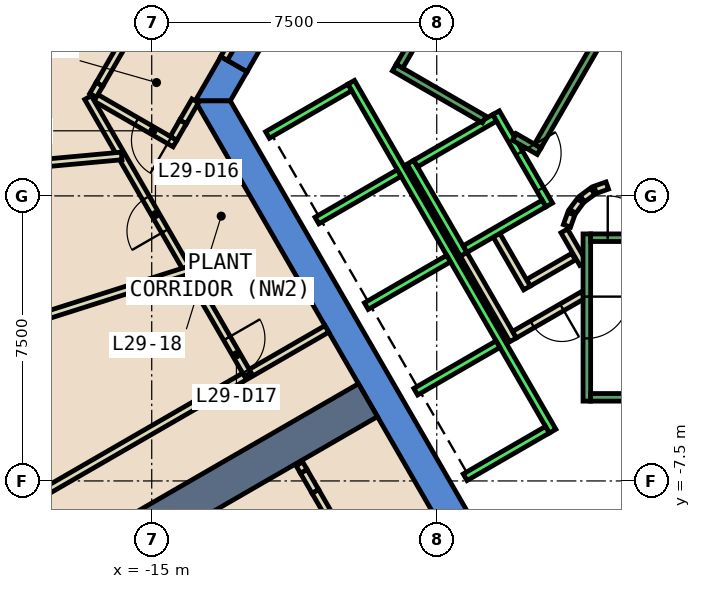
"""IFC4 building model, lengths in metres.
Left out: names, types, materials, properties, quantities, classifications, styles, units other than length and angle.
Written with IfcOpenShell. Run it as: python <this file> out.ifc"""

import sys

from ifc_helpers import new_model, si_unit, direction, frame, frame_2d, origin, place, context, subcontext, project, spatial, polyline, rectangle, outline, extrude, element, fill, save


model = new_model("IFC4")
c1 = context("Model", 3, precision=1e-05, world=origin(), true_north=direction((0.0, 1.0)))
c2 = subcontext(c1, "Body", "Model", "MODEL_VIEW")
j1 = project(units=[si_unit("LENGTHUNIT", "METRE"), si_unit("PLANEANGLEUNIT", "RADIAN")], contexts=[c1])
p1 = place(None, origin())
s1 = spatial("IfcSite", under=j1, at=p1, CompositionType="ELEMENT")
p2 = place(p1, origin())
s2 = spatial("IfcBuilding", under=s1, at=p2, CompositionType="ELEMENT")
p3 = place(p2, frame((0.0, 0.0, 132.8)))
s3 = spatial("IfcBuildingStorey", under=s2, at=p3, CompositionType="ELEMENT", Elevation=132.8)
p4 = place(p3, frame((0.0, 0.0, -0.6)))
e1 = element("IfcWall", 1, at=p4, inside=s3, PredefinedType="SHEAR", context=c2, shape_type="SweptSolid", body=[
    extrude(outline(polyline([(-12.49, 3.268), (-13.182, 3.667), (-13.856, 2.5), (-12.933, 2.5), (-12.49, 3.268)])), origin(), (0.0, 0.0, 1.0), 5.4),
])
p5 = place(p3, frame((0.0, 0.0, 3.6)))
e2 = element("IfcWall", 2, at=p5, inside=s3, PredefinedType="SHEAR", context=c2, shape_type="SweptSolid", body=[
    extrude(outline(polyline([(-13.182, 3.667), (-12.49, 3.268), (-11.575, 4.852), (-12.267, 5.252), (-13.182, 3.667)])), origin(), (0.0, 0.0, 1.0), 1.2),
])
p6 = place(p3, frame((0.0, 0.0, -0.6)))
e3 = element("IfcWall", 3, at=p6, inside=s3, PredefinedType="SHEAR", context=c2, shape_type="SweptSolid", body=[
    extrude(outline(polyline([(-13.856, 2.5), (-6.928, -9.5), (-6.466, -8.7), (-12.933, 2.5), (-13.856, 2.5)])), origin(), (0.0, 0.0, 1.0), 5.4),
])
p7 = place(p3, frame((-9.31, -5.375, 0.0), z_axis=(0.0, 0.0, 1.0), x_axis=(-0.86602173752, -0.500006350103, 0.0)))
e4 = element("IfcWall", 4, at=p7, inside=s3, PredefinedType="SHEAR", context=c2, shape_type="SweptSolid", body=[
    extrude(rectangle(XDim=31.463, YDim=1.0, at=frame_2d((15.732, 0.0))), origin(), (0.0, 0.0, 1.0), 4.8),
])
p8 = place(p3, frame((-3.9, -1.599, 0.0), z_axis=(0.0, 0.0, 1.0), x_axis=(-0.865969445389, -0.500096910261, 0.0)))
e5 = element("IfcWall", 5, at=p8, inside=s3, PredefinedType="PARTITIONING", context=c2, shape_type="SweptSolid", body=[
    extrude(rectangle(XDim=1.373, YDim=0.2, at=frame_2d((0.687, 0.0))), origin(), (0.0, 0.0, 1.0), 4.8),
])
p9 = place(p3, frame((-5.126, -2.422, 0.0), z_axis=(0.0, 0.0, 1.0), x_axis=(-0.500062241894, 0.865989465428, 0.0)))
e6 = element("IfcWall", 6, at=p9, inside=s3, PredefinedType="PARTITIONING", context=c2, shape_type="SweptSolid", body=[
    extrude(rectangle(XDim=1.7, YDim=0.2, at=frame_2d((0.85, 0.0))), origin(), (0.0, 0.0, 1.0), 4.8),
])
p10 = place(p3, frame((-5.492, -3.788, 0.0), z_axis=(0.0, 0.0, 1.0), x_axis=(-0.500008949224, 0.866020236886, 0.0)))
e7 = element("IfcWall", 7, at=p10, inside=s3, PredefinedType="PARTITIONING", context=c2, shape_type="SweptSolid", body=[
    extrude(rectangle(XDim=2.68, YDim=0.2, at=frame_2d((1.34, 0.0))), origin(), (0.0, 0.0, 1.0), 4.8),
])
p11 = place(p3, frame((-4.145, -0.92, 0.0), z_axis=(0.0, 0.0, 1.0), x_axis=(0.499743786207, -0.866173278362, 0.0)))
e8 = element("IfcWall", 8, at=p11, inside=s3, PredefinedType="PARTITIONING", context=c2, shape_type="SweptSolid", body=[
    extrude(rectangle(XDim=0.991, YDim=0.2, at=frame_2d((0.495, 0.0))), origin(), (0.0, 0.0, 1.0), 4.8),
])
p12 = place(p3, frame((-3.65, -2.61, 0.0), z_axis=(0.0, 0.0, 1.0), x_axis=(-0.866072462134, -0.499918483688, 0.0)))
e9 = element("IfcWall", 9, at=p12, inside=s3, PredefinedType="PARTITIONING", context=c2, shape_type="SweptSolid", body=[
    extrude(rectangle(XDim=2.084, YDim=0.2, at=frame_2d((1.042, 0.0))), origin(), (0.0, 0.0, 1.0), 4.8),
])
p13 = place(p12, frame((0.642, 0.0, 0.0)))
e10 = element("IfcOpeningElement", 10, at=p13, cuts=e9, PredefinedType="OPENING", context=c2, shape_type="SweptSolid", body=[
    extrude(rectangle(XDim=0.9, YDim=2.1, at=frame_2d((0.45, 1.05))), frame((0.0, 0.11, 0.0), z_axis=(0.0, -1.0, 0.0), x_axis=(1.0, 0.0, 0.0)), (0.0, 0.0, 1.0), 0.22),
])
p14 = place(p3, frame((-3.012, 0.273, 0.0), z_axis=(0.0, 0.0, 1.0), x_axis=(-0.942280615813, -0.334824194261, 0.0)))
e11 = element("IfcWall", 11, at=p14, inside=s3, PredefinedType="PARTITIONING", context=c2, shape_type="SweptSolid", body=[
    extrude(rectangle(XDim=0.338, YDim=0.2, at=frame_2d((0.169, 0.0))), origin(), (0.0, 0.0, 1.0), 4.8),
])
p15 = place(p3, frame((-3.397, 0.124, 0.0), z_axis=(0.0, 0.0, 1.0), x_axis=(-0.804311165252, -0.594208338422, 0.0)))
e12 = element("IfcWall", 12, at=p15, inside=s3, PredefinedType="PARTITIONING", context=c2, shape_type="SweptSolid", body=[
    extrude(rectangle(XDim=0.338, YDim=0.2, at=frame_2d((0.169, 0.0))), origin(), (0.0, 0.0, 1.0), 4.8),
])
p16 = place(p3, frame((-3.723, -0.131, 0.0), z_axis=(0.0, 0.0, 1.0), x_axis=(-0.594675113454, -0.803966112121, 0.0)))
e13 = element("IfcWall", 13, at=p16, inside=s3, PredefinedType="PARTITIONING", context=c2, shape_type="SweptSolid", body=[
    extrude(rectangle(XDim=0.338, YDim=0.2, at=frame_2d((0.169, 0.0))), origin(), (0.0, 0.0, 1.0), 4.8),
])
p17 = place(p3, frame((-3.96, -0.47, 0.0), z_axis=(0.0, 0.0, 1.0), x_axis=(-0.334824194261, -0.942280615813, 0.0)))
e14 = element("IfcWall", 14, at=p17, inside=s3, PredefinedType="PARTITIONING", context=c2, shape_type="SweptSolid", body=[
    extrude(rectangle(XDim=0.338, YDim=0.2, at=frame_2d((0.169, 0.0))), origin(), (0.0, 0.0, 1.0), 4.8),
])
p18 = place(p3, frame((-2.771, 4.7, 0.0), z_axis=(0.0, 0.0, 1.0), x_axis=(0.499969479948, -0.866043023828, 0.0)))
e15 = element("IfcWall", 15, at=p18, inside=s3, PredefinedType="PARTITIONING", context=c2, shape_type="SweptSolid", body=[
    extrude(rectangle(XDim=4.99, YDim=0.2, at=frame_2d((2.495, 0.0))), origin(), (0.0, 0.0, 1.0), 4.8),
])
p19 = place(p18, frame((1.945, 0.0, 0.0)))
e16 = element("IfcOpeningElement", 16, at=p19, cuts=e15, PredefinedType="OPENING", context=c2, shape_type="SweptSolid", body=[
    extrude(rectangle(XDim=1.0, YDim=2.1, at=frame_2d((0.5, 1.05))), frame((0.0, 0.11, 0.0), z_axis=(0.0, -1.0, 0.0), x_axis=(1.0, 0.0, 0.0)), (0.0, 0.0, 1.0), 0.22),
])
p20 = place(p3, frame((-39.358, -20.223, 0.0), z_axis=(0.0, 0.0, 1.0), x_axis=(0.866032184561, 0.499988255166, 0.0)))
e17 = element("IfcWall", 17, at=p20, inside=s3, PredefinedType="PARTITIONING", context=c2, shape_type="SweptSolid", body=[
    extrude(rectangle(XDim=33.447, YDim=0.2, at=frame_2d((16.723, 0.0))), origin(), (0.0, 0.0, 1.0), 4.8),
])
p21 = place(p3, frame((-13.856, 2.501, 0.0), z_axis=(0.0, 0.0, 1.0), x_axis=(-0.500766044352, -0.865582675903, 0.0)))
e18 = element("IfcWall", 18, at=p21, inside=s3, PredefinedType="PARTITIONING", context=c2, shape_type="SweptSolid", body=[
    extrude(rectangle(XDim=0.641, YDim=0.2, at=frame_2d((0.321, 0.0))), origin(), (0.0, 0.0, 1.0), 2.4),
])
p22 = place(p3, frame((-14.388, 1.379, 0.0), z_axis=(0.0, 0.0, 1.0), x_axis=(-0.866022959057, 0.500004234368, 0.0)))
e19 = element("IfcWall", 19, at=p22, inside=s3, PredefinedType="PARTITIONING", context=c2, shape_type="SweptSolid", body=[
    extrude(rectangle(XDim=2.5, YDim=0.2, at=frame_2d((1.25, 0.0))), origin(), (0.0, 0.0, 1.0), 4.8),
])
p23 = place(p22, frame((0.168, 0.0, 0.0)))
e20 = element("IfcOpeningElement", 20, at=p23, cuts=e19, PredefinedType="OPENING", context=c2, shape_type="SweptSolid", body=[
    extrude(rectangle(XDim=1.0, YDim=2.1, at=frame_2d((0.5, 1.05))), frame((0.0, 0.11, 0.0), z_axis=(0.0, -1.0, 0.0), x_axis=(1.0, 0.0, 0.0)), (0.0, 0.0, 1.0), 0.22),
])
p24 = place(p3, frame((-16.543, 2.646, 0.0), z_axis=(0.0, 0.0, 1.0), x_axis=(0.500808028896, 0.865558385202, 0.0)))
e21 = element("IfcWall", 21, at=p24, inside=s3, PredefinedType="PARTITIONING", context=c2, shape_type="SweptSolid", body=[
    extrude(rectangle(XDim=0.337, YDim=0.2, at=frame_2d((0.169, 0.0))), origin(), (0.0, 0.0, 1.0), 2.4),
])
p25 = place(p3, frame((-14.001, -2.05, 0.0), z_axis=(0.0, 0.0, 1.0), x_axis=(-0.499842197933, 0.866116491683, 0.0)))
e22 = element("IfcWall", 22, at=p25, inside=s3, PredefinedType="PARTITIONING", context=c2, shape_type="SweptSolid", body=[
    extrude(rectangle(XDim=5.354, YDim=0.2, at=frame_2d((2.677, 0.0))), origin(), (0.0, 0.0, 1.0), 4.8),
])
p26 = place(p25, frame((1.301, 0.0, 0.0)))
e23 = element("IfcOpeningElement", 23, at=p26, cuts=e22, PredefinedType="OPENING", context=c2, shape_type="SweptSolid", body=[
    extrude(rectangle(XDim=1.0, YDim=2.1, at=frame_2d((0.5, 1.05))), frame((0.0, 0.11, 0.0), z_axis=(0.0, -1.0, 0.0), x_axis=(1.0, 0.0, 0.0)), (0.0, 0.0, 1.0), 0.22),
])
p27 = place(p3, frame((-14.001, -2.05, 0.0), z_axis=(0.0, 0.0, 1.0), x_axis=(0.500026340207, -0.866010195725, 0.0)))
e24 = element("IfcWall", 24, at=p27, inside=s3, PredefinedType="PARTITIONING", context=c2, shape_type="SweptSolid", body=[
    extrude(rectangle(XDim=3.06, YDim=0.2, at=frame_2d((1.53, 0.0))), origin(), (0.0, 0.0, 1.0), 4.8),
])
p28 = place(p27, frame((1.96, 0.0, 0.0)))
e25 = element("IfcOpeningElement", 25, at=p28, cuts=e24, PredefinedType="OPENING", context=c2, shape_type="SweptSolid", body=[
    extrude(rectangle(XDim=1.0, YDim=2.1, at=frame_2d((0.5, 1.05))), frame((0.0, 0.11, 0.0), z_axis=(0.0, -1.0, 0.0), x_axis=(1.0, 0.0, 0.0)), (0.0, 0.0, 1.0), 0.22),
])
p29 = place(p3, frame((-15.791, 1.051, 0.0), z_axis=(0.0, 0.0, 1.0), x_axis=(-0.995814925951, -0.091392741793, 0.0)))
e26 = element("IfcWall", 26, at=p29, inside=s3, PredefinedType="PARTITIONING", context=c2, shape_type="SweptSolid", body=[
    extrude(rectangle(XDim=15.077, YDim=0.2, at=frame_2d((7.539, 0.0))), origin(), (0.0, 0.0, 1.0), 4.8),
])
p30 = place(p3, frame((-14.051, -1.963, 0.0), z_axis=(0.0, 0.0, 1.0), x_axis=(-0.953071469252, -0.302745395504, 0.0)))
e27 = element("IfcWall", 27, at=p30, inside=s3, PredefinedType="PARTITIONING", context=c2, shape_type="SweptSolid", body=[
    extrude(rectangle(XDim=23.905, YDim=0.2, at=frame_2d((11.952, 0.0))), origin(), (0.0, 0.0, 1.0), 4.8),
])
p31 = place(p3, frame((-12.181, 5.202, 0.0), z_axis=(0.0, 0.0, 1.0), x_axis=(-0.500215337403, -0.865901042976, 0.0)))
e28 = element("IfcWall", 28, at=p31, inside=s3, PredefinedType="PARTITIONING", context=c2, shape_type="SweptSolid", body=[
    extrude(rectangle(XDim=1.829, YDim=0.2, at=frame_2d((0.915, 0.0))), origin(), (0.0, 0.0, 1.0), 2.4),
])
p32 = place(p31, frame((0.415, 0.0, 0.0)))
e29 = element("IfcOpeningElement", 29, at=p32, cuts=e28, PredefinedType="OPENING", context=c2, shape_type="SweptSolid", body=[
    extrude(rectangle(XDim=1.0, YDim=2.1, at=frame_2d((0.5, 1.05))), frame((0.0, 0.11, 0.0), z_axis=(0.0, -1.0, 0.0), x_axis=(1.0, 0.0, 0.0)), (0.0, 0.0, 1.0), 0.22),
])
p33 = place(p3, frame((-10.2, -8.632, 0.0), z_axis=(0.0, 0.0, 1.0), x_axis=(-0.500482758314, 0.865746503678, 0.0)))
e30 = element("IfcWall", 30, at=p33, inside=s3, PredefinedType="PARTITIONING", context=c2, shape_type="SweptSolid", body=[
    extrude(rectangle(XDim=0.991, YDim=0.2, at=frame_2d((0.496, 0.0))), origin(), (0.0, 0.0, 1.0), 2.3),
])
p34 = place(p3, frame((-10.696, -7.774, 0.0), z_axis=(0.0, 0.0, 1.0), x_axis=(-0.49972245349, 0.866185586049, 0.0)))
e31 = element("IfcWall", 31, at=p34, inside=s3, PredefinedType="PARTITIONING", context=c2, shape_type="SweptSolid", body=[
    extrude(rectangle(XDim=0.608, YDim=0.2, at=frame_2d((0.304, 0.0))), origin(), (0.0, 0.0, 1.0), 4.8),
])
p35 = place(p3, frame((-11.0, -7.247, 0.0), z_axis=(0.0, 0.0, 1.0), x_axis=(-0.499504513693, 0.866311284008, 0.0)))
e32 = element("IfcWall", 32, at=p35, inside=s3, PredefinedType="PARTITIONING", context=c2, shape_type="SweptSolid", body=[
    extrude(rectangle(XDim=0.226, YDim=0.2, at=frame_2d((0.113, 0.0))), origin(), (0.0, 0.0, 1.0), 2.1),
])
p36 = place(p3, frame((-14.177, 1.946, 0.0), z_axis=(0.0, 0.0, 1.0), x_axis=(-0.499736647136, -0.866177397251, 0.0)))
e33 = element("IfcWall", 33, at=p36, inside=s3, PredefinedType="PARTITIONING", context=c2, shape_type="SweptSolid", body=[
    extrude(rectangle(XDim=0.496, YDim=0.2, at=frame_2d((0.248, 0.0))), origin(), (0.0, 0.0, 1.0), 4.8),
])
p37 = place(p3, frame((-16.374, 2.938, 0.0), z_axis=(0.0, 0.0, 1.0), x_axis=(0.49986000933, 0.866106212351, 0.0)))
e34 = element("IfcWall", 34, at=p37, inside=s3, PredefinedType="PARTITIONING", context=c2, shape_type="SweptSolid", body=[
    extrude(rectangle(XDim=3.585, YDim=0.2, at=frame_2d((1.792, 0.0))), origin(), (0.0, 0.0, 1.0), 4.8),
])
p38 = place(p37, frame((2.197, 0.0, 0.0)))
e35 = element("IfcOpeningElement", 35, at=p38, cuts=e34, PredefinedType="OPENING", context=c2, shape_type="SweptSolid", body=[
    extrude(rectangle(XDim=1.0, YDim=2.1, at=frame_2d((0.5, 1.05))), frame((0.0, 0.11, 0.0), z_axis=(0.0, -1.0, 0.0), x_axis=(1.0, 0.0, 0.0)), (0.0, 0.0, 1.0), 0.22),
])
p39 = place(p3, frame((-5.94, 2.188, 0.0), z_axis=(0.0, 0.0, 1.0), x_axis=(0.49994636267, -0.866056369097, 0.0)))
e36 = element("IfcWall", 36, at=p39, inside=s3, PredefinedType="STANDARD", context=c2, shape_type="SweptSolid", body=[
    extrude(rectangle(XDim=2.8, YDim=0.2, at=frame_2d((1.4, 0.0))), origin(), (0.0, 0.0, 1.0), 4.8),
])
p40 = place(p39, frame((1.225, 0.0, 0.0)))
e37 = element("IfcOpeningElement", 37, at=p40, cuts=e36, PredefinedType="OPENING", context=c2, shape_type="SweptSolid", body=[
    extrude(rectangle(XDim=1.1, YDim=2.1, at=frame_2d((0.55, 1.05))), frame((0.0, 0.11, 0.0), z_axis=(0.0, -1.0, 0.0), x_axis=(1.0, 0.0, 0.0)), (0.0, 0.0, 1.0), 0.22),
])
p41 = place(p3, frame((-8.192, 0.888, 0.0), z_axis=(0.0, 0.0, 1.0), x_axis=(0.49994636267, -0.866056369097, 0.0)))
e38 = element("IfcWall", 38, at=p41, inside=s3, PredefinedType="STANDARD", context=c2, shape_type="SweptSolid", body=[
    extrude(rectangle(XDim=2.8, YDim=0.2, at=frame_2d((1.4, 0.0))), origin(), (0.0, 0.0, 1.0), 4.8),
])
for number, where, z_axis, x_axis in (
    (39, (-5.977, 2.052, 0.0), (0.0, 0.0, 1.0), (-0.866, -0.5, 0.0)),
    (40, (-4.677, -0.2, 0.0), (0.0, 0.0, 1.0), (-0.866, -0.5, 0.0)),
):
    element("IfcWall", number, at=place(p3, frame(where, z_axis=z_axis, x_axis=x_axis)), inside=s3, PredefinedType="STANDARD", context=c2, shape_type="SweptSolid", body=[
        extrude(rectangle(XDim=2.399, YDim=0.2, at=frame_2d((1.2, 0.0))), origin(), (0.0, 0.0, 1.0), 4.8),
    ])
p42 = place(p3, frame((-9.751, 2.99, 0.0), z_axis=(0.0, 0.0, 1.0), x_axis=(0.50000090737, -0.866024879913, 0.0)))
e41 = element("IfcWall", 41, at=p42, inside=s3, PredefinedType="STANDARD", context=c2, shape_type="SweptSolid", body=[
    extrude(rectangle(XDim=10.6, YDim=0.2, at=frame_2d((5.3, 0.0))), origin(), (0.0, 0.0, 1.0), 4.8),
])
p43 = place(p3, frame((-9.788, 2.853, 0.0), z_axis=(0.0, 0.0, 1.0), x_axis=(-0.865998541277, -0.500046524342, 0.0)))
e42 = element("IfcWall", 42, at=p43, inside=s3, PredefinedType="STANDARD", context=c2, shape_type="SweptSolid", body=[
    extrude(rectangle(XDim=2.5, YDim=0.2, at=frame_2d((1.25, 0.0))), origin(), (0.0, 0.0, 1.0), 4.8),
])
for number, where, z_axis, x_axis in (
    (43, (-8.488, 0.602, 0.0), (0.0, 0.0, 1.0), (-0.866, -0.5, 0.0)),
    (44, (-7.188, -1.65, 0.0), (0.0, 0.0, 1.0), (-0.866, -0.5, 0.0)),
    (45, (-5.888, -3.902, 0.0), (0.0, 0.0, 1.0), (-0.866, -0.5, 0.0)),
    (46, (-4.588, -6.153, 0.0), (0.0, 0.0, 1.0), (-0.866, -0.5, 0.0)),
):
    element("IfcWall", number, at=place(p3, frame(where, z_axis=z_axis, x_axis=x_axis)), inside=s3, PredefinedType="STANDARD", context=c2, shape_type="SweptSolid", body=[
        extrude(rectangle(XDim=2.5, YDim=0.2, at=frame_2d((1.25, 0.0))), origin(), (0.0, 0.0, 1.0), 4.8),
    ])
p44 = place(p3, frame((-3.55, -1.0, 0.0), z_axis=(0.0, 0.0, 1.0), x_axis=(0.0, -1.0, 0.0)))
e47 = element("IfcWall", 47, at=p44, inside=s3, PredefinedType="STANDARD", context=c2, shape_type="SweptSolid", body=[
    extrude(rectangle(XDim=4.4, YDim=0.2, at=frame_2d((2.2, 0.0))), origin(), (0.0, 0.0, 1.0), 4.8),
])
p45 = place(p44, frame((1.65, 0.0, 0.0)))
e48 = element("IfcOpeningElement", 48, at=p45, cuts=e47, PredefinedType="OPENING", context=c2, shape_type="SweptSolid", body=[
    extrude(rectangle(XDim=1.1, YDim=2.2, at=frame_2d((0.55, 1.1))), frame((0.0, 0.11, 0.0), z_axis=(0.0, -1.0, 0.0), x_axis=(1.0, 0.0, 0.0)), (0.0, 0.0, 1.0), 0.22),
])
p46 = place(p3, frame((-3.45, -1.1, 0.0), z_axis=(0.0, 0.0, 1.0), x_axis=(1.0, 0.0, 0.0)))
e49 = element("IfcWall", 49, at=p46, inside=s3, PredefinedType="STANDARD", context=c2, shape_type="SweptSolid", body=[
    extrude(rectangle(XDim=6.9, YDim=0.2, at=frame_2d((3.45, 0.0))), origin(), (0.0, 0.0, 1.0), 4.8),
])
p47 = place(p46, frame((0.45, 0.0, 0.0)))
e50 = element("IfcOpeningElement", 50, at=p47, cuts=e49, PredefinedType="OPENING", context=c2, shape_type="SweptSolid", body=[
    extrude(rectangle(XDim=1.1, YDim=2.2, at=frame_2d((0.55, 1.1))), frame((0.0, 0.11, 0.0), z_axis=(0.0, -1.0, 0.0), x_axis=(1.0, 0.0, 0.0)), (0.0, 0.0, 1.0), 0.22),
])
p48 = place(p3, frame((-3.45, -5.3, 0.0), z_axis=(0.0, 0.0, 1.0), x_axis=(1.0, 0.0, 0.0)))
e51 = element("IfcWall", 51, at=p48, inside=s3, PredefinedType="STANDARD", context=c2, shape_type="SweptSolid", body=[
    extrude(rectangle(XDim=6.9, YDim=0.2, at=frame_2d((3.45, 0.0))), origin(), (0.0, 0.0, 1.0), 4.8),
])
p49 = place(p3, frame((-6.25, 2.01, 0.0), z_axis=(0.0, 0.0, 1.0), x_axis=(-0.86611865017, 0.499838457731, 0.0)))
e52 = element("IfcWall", 52, at=p49, inside=s3, PredefinedType="STANDARD", context=c2, shape_type="SweptSolid", body=[
    extrude(rectangle(XDim=2.733, YDim=0.2, at=frame_2d((1.366, 0.0))), origin(), (0.0, 0.0, 1.0), 4.8),
])
p50 = place(p3, frame((-4.806, 1.176, 0.0), z_axis=(0.0, 0.0, 1.0), x_axis=(-0.866558586415, 0.499075361355, 0.0)))
e53 = element("IfcWall", 53, at=p50, inside=s3, PredefinedType="STANDARD", context=c2, shape_type="SweptSolid", body=[
    extrude(rectangle(XDim=0.751, YDim=0.2, at=frame_2d((0.376, 0.0))), origin(), (0.0, 0.0, 1.0), 4.8),
])
p51 = place(p3, frame((-1.393, 7.288, 0.0), z_axis=(0.0, 0.0, 1.0), x_axis=(-0.499963383562, -0.866046543262, 0.0)))
e54 = element("IfcWall", 54, at=p51, inside=s3, PredefinedType="STANDARD", context=c2, shape_type="SweptSolid", body=[
    extrude(rectangle(XDim=6.9, YDim=0.2, at=frame_2d((3.45, 0.0))), origin(), (0.0, 0.0, 1.0), 4.8),
])
p52 = place(p51, frame((0.45, 0.0, 0.0)))
e55 = element("IfcOpeningElement", 55, at=p52, cuts=e54, PredefinedType="OPENING", context=c2, shape_type="SweptSolid", body=[
    extrude(rectangle(XDim=1.1, YDim=2.2, at=frame_2d((0.55, 1.1))), frame((0.0, 0.11, 0.0), z_axis=(0.0, -1.0, 0.0), x_axis=(1.0, 0.0, 0.0)), (0.0, 0.0, 1.0), 0.22),
])
p53 = place(p3, frame((-5.03, 9.388, 0.0), z_axis=(0.0, 0.0, 1.0), x_axis=(-0.499978703459, -0.866037698999, 0.0)))
e56 = element("IfcWall", 56, at=p53, inside=s3, PredefinedType="STANDARD", context=c2, shape_type="SweptSolid", body=[
    extrude(rectangle(XDim=6.9, YDim=0.2, at=frame_2d((3.45, 0.0))), origin(), (0.0, 0.0, 1.0), 4.8),
])
p54 = place(p23, origin())
e57 = element("IfcDoor", 57, at=p54, inside=s3, OperationType="SINGLE_SWING_LEFT", PredefinedType="DOOR", context=c2, shape_type="SweptSolid", body=[
    extrude(rectangle(XDim=1.0, YDim=2.1, at=frame_2d((0.5, 1.05))), frame((0.0, 0.025, 0.0), z_axis=(0.0, -1.0, 0.0), x_axis=(1.0, 0.0, 0.0)), (0.0, 0.0, 1.0), 0.05),
])
fill(e20, e57)
p55 = place(p26, origin())
e58 = element("IfcDoor", 58, at=p55, inside=s3, OperationType="SINGLE_SWING_RIGHT", PredefinedType="DOOR", context=c2, shape_type="SweptSolid", body=[
    extrude(rectangle(XDim=1.0, YDim=2.1, at=frame_2d((0.5, 1.05))), frame((0.0, 0.025, 0.0), z_axis=(0.0, -1.0, 0.0), x_axis=(1.0, 0.0, 0.0)), (0.0, 0.0, 1.0), 0.05),
])
fill(e23, e58)
p56 = place(p28, origin())
e59 = element("IfcDoor", 59, at=p56, inside=s3, OperationType="SINGLE_SWING_LEFT", PredefinedType="DOOR", context=c2, shape_type="SweptSolid", body=[
    extrude(rectangle(XDim=1.0, YDim=2.1, at=frame_2d((0.5, 1.05))), frame((0.0, 0.025, 0.0), z_axis=(0.0, -1.0, 0.0), x_axis=(1.0, 0.0, 0.0)), (0.0, 0.0, 1.0), 0.05),
])
fill(e25, e59)
p57 = place(p13, origin())
e60 = element("IfcDoor", 60, at=p57, inside=s3, OperationType="SINGLE_SWING_LEFT", PredefinedType="DOOR", context=c2, shape_type="SweptSolid", body=[
    extrude(rectangle(XDim=0.9, YDim=2.1, at=frame_2d((0.45, 1.05))), frame((0.0, 0.025, 0.0), z_axis=(0.0, -1.0, 0.0), x_axis=(1.0, 0.0, 0.0)), (0.0, 0.0, 1.0), 0.05),
])
fill(e10, e60)
p58 = place(p40, origin())
e61 = element("IfcDoor", 61, at=p58, inside=s3, OperationType="SLIDING_TO_LEFT", PredefinedType="DOOR", context=c2, shape_type="SweptSolid", body=[
    extrude(rectangle(XDim=1.1, YDim=2.1, at=frame_2d((0.55, 1.05))), frame((0.0, 0.025, 0.0), z_axis=(0.0, -1.0, 0.0), x_axis=(1.0, 0.0, 0.0)), (0.0, 0.0, 1.0), 0.05),
])
fill(e37, e61)
p59 = place(p47, origin())
e62 = element("IfcDoor", 62, at=p59, inside=s3, OperationType="SINGLE_SWING_LEFT", PredefinedType="DOOR", context=c2, shape_type="SweptSolid", body=[
    extrude(rectangle(XDim=1.1, YDim=2.2, at=frame_2d((0.55, 1.1))), frame((0.0, 0.025, 0.0), z_axis=(0.0, -1.0, 0.0), x_axis=(1.0, 0.0, 0.0)), (0.0, 0.0, 1.0), 0.05),
])
fill(e50, e62)
p60 = place(p45, origin())
e63 = element("IfcDoor", 63, at=p60, inside=s3, OperationType="SINGLE_SWING_LEFT", PredefinedType="DOOR", context=c2, shape_type="SweptSolid", body=[
    extrude(rectangle(XDim=1.1, YDim=2.2, at=frame_2d((0.55, 1.1))), frame((0.0, 0.025, 0.0), z_axis=(0.0, -1.0, 0.0), x_axis=(1.0, 0.0, 0.0)), (0.0, 0.0, 1.0), 0.05),
])
fill(e48, e63)
save(model, sys.argv[1])
